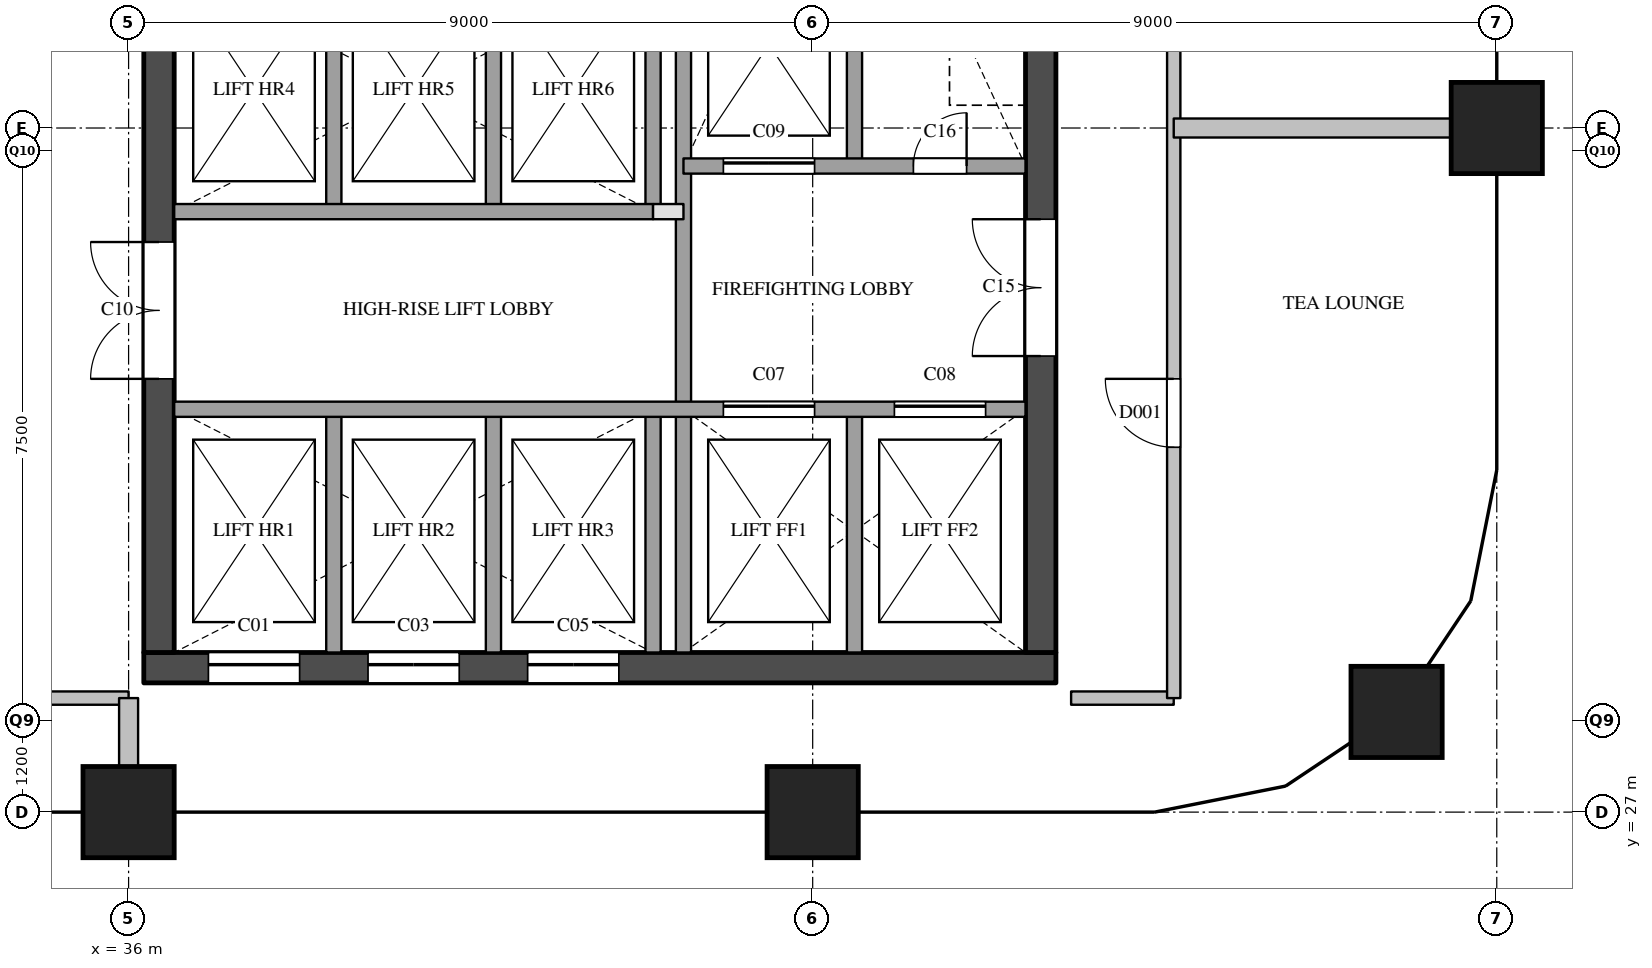
"""IFC4 building model, lengths in metres.
Left out: names, types, materials, properties, quantities, classifications, styles, units other than length and angle.
Written with IfcOpenShell. Run it as: python <this file> out.ifc"""

import sys

from ifc_helpers import new_model, si_unit, direction, frame, frame_2d, origin, origin_2d, place, context, subcontext, project, spatial, rectangle, extrude, element, fill, save


model = new_model("IFC4")
c1 = context("Model", 3, precision=1e-05, world=origin(), true_north=direction((0.0, 1.0)))
c2 = subcontext(c1, "Body", "Model", "MODEL_VIEW")
j1 = project(units=[si_unit("LENGTHUNIT", "METRE"), si_unit("PLANEANGLEUNIT", "RADIAN")], contexts=[c1])
p1 = place(None, origin())
s1 = spatial("IfcSite", under=j1, at=p1, CompositionType="ELEMENT")
p2 = place(p1, origin())
s2 = spatial("IfcBuilding", under=s1, at=p2, CompositionType="ELEMENT")
p3 = place(p2, frame((0.0, 0.0, 226.7)))
s3 = spatial("IfcBuildingStorey", under=s2, at=p3, CompositionType="ELEMENT", Elevation=226.7)
for number, where, z_axis, x_axis in (
    (1, (36.0, 27.0, 0.0), (0.0, 0.0, 1.0), (1.0, 0.0, 0.0)),
    (2, (45.0, 27.0, 0.0), (0.0, 0.0, 1.0), (1.0, 0.0, 0.0)),
    (3, (52.682, 28.318, 0.0), (0.0, 0.0, 1.0), (1.0, 0.0, 0.0)),
    (4, (54.0, 36.0, 0.0), (0.0, 0.0, 1.0), (1.0, 0.0, 0.0)),
):
    element("IfcColumn", number, at=place(p3, frame(where, z_axis=z_axis, x_axis=x_axis)), inside=s3, PredefinedType="COLUMN", context=c2, shape_type="SweptSolid", body=[
        extrude(rectangle(XDim=1.2, YDim=1.2, at=origin_2d()), origin(), (0.0, 0.0, 1.0), 3.9),
    ])
p4 = place(p3, frame((36.2, 28.9, 0.0), z_axis=(0.0, 0.0, 1.0), x_axis=(1.0, 0.0, 0.0)))
e5 = element("IfcWall", 5, at=p4, inside=s3, PredefinedType="SHEAR", context=c2, shape_type="SweptSolid", body=[
    extrude(rectangle(XDim=12.0, YDim=0.4, at=frame_2d((6.0, 0.0))), origin(), (0.0, 0.0, 1.0), 3.5),
])
p5 = place(p4, frame((0.85, 0.0, 0.0)))
e6 = element("IfcOpeningElement", 6, at=p5, cuts=e5, PredefinedType="OPENING", context=c2, shape_type="SweptSolid", body=[
    extrude(rectangle(XDim=1.2, YDim=2.1, at=frame_2d((0.6, 1.05))), frame((0.0, 0.21, 0.0), z_axis=(0.0, -1.0, 0.0), x_axis=(1.0, 0.0, 0.0)), (0.0, 0.0, 1.0), 0.42),
])
p6 = place(p4, frame((2.95, 0.0, 0.0)))
e7 = element("IfcOpeningElement", 7, at=p6, cuts=e5, PredefinedType="OPENING", context=c2, shape_type="SweptSolid", body=[
    extrude(rectangle(XDim=1.2, YDim=2.1, at=frame_2d((0.6, 1.05))), frame((0.0, 0.21, 0.0), z_axis=(0.0, -1.0, 0.0), x_axis=(1.0, 0.0, 0.0)), (0.0, 0.0, 1.0), 0.42),
])
p7 = place(p4, frame((5.05, 0.0, 0.0)))
e8 = element("IfcOpeningElement", 8, at=p7, cuts=e5, PredefinedType="OPENING", context=c2, shape_type="SweptSolid", body=[
    extrude(rectangle(XDim=1.2, YDim=2.1, at=frame_2d((0.6, 1.05))), frame((0.0, 0.21, 0.0), z_axis=(0.0, -1.0, 0.0), x_axis=(1.0, 0.0, 0.0)), (0.0, 0.0, 1.0), 0.42),
])
p8 = place(p3, frame((36.4, 29.1, 0.0), z_axis=(0.0, 0.0, 1.0), x_axis=(0.0, 1.0, 0.0)))
e9 = element("IfcWall", 9, at=p8, inside=s3, PredefinedType="SHEAR", context=c2, shape_type="SweptSolid", body=[
    extrude(rectangle(XDim=20.3, YDim=0.4, at=frame_2d((10.15, 0.0))), origin(), (0.0, 0.0, 1.0), 3.5),
])
p9 = place(p8, frame((3.6, 0.0, 0.0)))
e10 = element("IfcOpeningElement", 10, at=p9, cuts=e9, PredefinedType="OPENING", context=c2, shape_type="SweptSolid", body=[
    extrude(rectangle(XDim=1.8, YDim=2.1, at=frame_2d((0.9, 1.05))), frame((0.0, 0.21, 0.0), z_axis=(0.0, -1.0, 0.0), x_axis=(1.0, 0.0, 0.0)), (0.0, 0.0, 1.0), 0.42),
])
p10 = place(p3, frame((48.0, 29.1, 0.0), z_axis=(0.0, 0.0, 1.0), x_axis=(0.0, 1.0, 0.0)))
e11 = element("IfcWall", 11, at=p10, inside=s3, PredefinedType="SHEAR", context=c2, shape_type="SweptSolid", body=[
    extrude(rectangle(XDim=20.3, YDim=0.4, at=frame_2d((10.15, 0.0))), origin(), (0.0, 0.0, 1.0), 3.5),
])
p11 = place(p10, frame((12.5, 0.0, 0.0)))
e12 = element("IfcOpeningElement", 12, at=p11, cuts=e11, PredefinedType="OPENING", context=c2, shape_type="SweptSolid", body=[
    extrude(rectangle(XDim=0.7, YDim=2.1, at=frame_2d((0.35, 1.05))), frame((0.0, 0.21, 0.0), z_axis=(0.0, -1.0, 0.0), x_axis=(1.0, 0.0, 0.0)), (0.0, 0.0, 1.0), 0.42),
])
p12 = place(p10, frame((3.9, 0.0, 0.0)))
e13 = element("IfcOpeningElement", 13, at=p12, cuts=e11, PredefinedType="OPENING", context=c2, shape_type="SweptSolid", body=[
    extrude(rectangle(XDim=1.8, YDim=2.1, at=frame_2d((0.9, 1.05))), frame((0.0, 0.21, 0.0), z_axis=(0.0, -1.0, 0.0), x_axis=(1.0, 0.0, 0.0)), (0.0, 0.0, 1.0), 0.42),
])
p13 = place(p10, frame((16.4, 0.0, 0.0)))
e14 = element("IfcOpeningElement", 14, at=p13, cuts=e11, PredefinedType="OPENING", context=c2, shape_type="SweptSolid", body=[
    extrude(rectangle(XDim=1.0, YDim=2.1, at=frame_2d((0.5, 1.05))), frame((0.0, 0.21, 0.0), z_axis=(0.0, -1.0, 0.0), x_axis=(1.0, 0.0, 0.0)), (0.0, 0.0, 1.0), 0.42),
])
p14 = place(p3, frame((38.7, 29.1, 0.0), z_axis=(0.0, 0.0, 1.0), x_axis=(0.0, 1.0, 0.0)))
e15 = element("IfcWall", 15, at=p14, inside=s3, PredefinedType="SOLIDWALL", context=c2, shape_type="SweptSolid", body=[
    extrude(rectangle(XDim=3.2, YDim=0.2, at=frame_2d((1.6, 0.0))), origin(), (0.0, 0.0, 1.0), 3.5),
])
p15 = place(p3, frame((38.7, 34.9, 0.0), z_axis=(0.0, 0.0, 1.0), x_axis=(0.0, 1.0, 0.0)))
e16 = element("IfcWall", 16, at=p15, inside=s3, PredefinedType="SOLIDWALL", context=c2, shape_type="SweptSolid", body=[
    extrude(rectangle(XDim=3.2, YDim=0.2, at=frame_2d((1.6, 0.0))), origin(), (0.0, 0.0, 1.0), 3.5),
])
p16 = place(p3, frame((40.8, 29.1, 0.0), z_axis=(0.0, 0.0, 1.0), x_axis=(0.0, 1.0, 0.0)))
e17 = element("IfcWall", 17, at=p16, inside=s3, PredefinedType="SOLIDWALL", context=c2, shape_type="SweptSolid", body=[
    extrude(rectangle(XDim=3.2, YDim=0.2, at=frame_2d((1.6, 0.0))), origin(), (0.0, 0.0, 1.0), 3.5),
])
p17 = place(p3, frame((40.8, 34.9, 0.0), z_axis=(0.0, 0.0, 1.0), x_axis=(0.0, 1.0, 0.0)))
e18 = element("IfcWall", 18, at=p17, inside=s3, PredefinedType="SOLIDWALL", context=c2, shape_type="SweptSolid", body=[
    extrude(rectangle(XDim=3.2, YDim=0.2, at=frame_2d((1.6, 0.0))), origin(), (0.0, 0.0, 1.0), 3.5),
])
p18 = place(p3, frame((42.9, 29.1, 0.0), z_axis=(0.0, 0.0, 1.0), x_axis=(0.0, 1.0, 0.0)))
e19 = element("IfcWall", 19, at=p18, inside=s3, PredefinedType="SOLIDWALL", context=c2, shape_type="SweptSolid", body=[
    extrude(rectangle(XDim=3.2, YDim=0.2, at=frame_2d((1.6, 0.0))), origin(), (0.0, 0.0, 1.0), 3.5),
])
p19 = place(p3, frame((42.9, 34.9, 0.0), z_axis=(0.0, 0.0, 1.0), x_axis=(0.0, 1.0, 0.0)))
e20 = element("IfcWall", 20, at=p19, inside=s3, PredefinedType="SOLIDWALL", context=c2, shape_type="SweptSolid", body=[
    extrude(rectangle(XDim=3.2, YDim=0.2, at=frame_2d((1.6, 0.0))), origin(), (0.0, 0.0, 1.0), 3.5),
])
p20 = place(p3, frame((43.3, 29.1, 0.0), z_axis=(0.0, 0.0, 1.0), x_axis=(0.0, 1.0, 0.0)))
e21 = element("IfcWall", 21, at=p20, inside=s3, PredefinedType="SOLIDWALL", context=c2, shape_type="SweptSolid", body=[
    extrude(rectangle(XDim=9.9, YDim=0.2, at=frame_2d((4.95, 0.0))), origin(), (0.0, 0.0, 1.0), 3.5),
])
for number, where, z_axis, x_axis in (
    (22, (45.55, 29.1, 0.0), (0.0, 0.0, 1.0), (0.0, 1.0, 0.0)),
    (23, (45.55, 35.5, 0.0), (0.0, 0.0, 1.0), (0.0, 1.0, 0.0)),
):
    element("IfcWall", number, at=place(p3, frame(where, z_axis=z_axis, x_axis=x_axis)), inside=s3, PredefinedType="SOLIDWALL", context=c2, shape_type="SweptSolid", body=[
        extrude(rectangle(XDim=3.2, YDim=0.2, at=frame_2d((1.6, 0.0))), origin(), (0.0, 0.0, 1.0), 3.5),
    ])
p21 = place(p3, frame((36.6, 32.3, 0.0), z_axis=(0.0, 0.0, 1.0), x_axis=(1.0, 0.0, 0.0)))
e24 = element("IfcWall", 24, at=p21, inside=s3, PredefinedType="SOLIDWALL", context=c2, shape_type="SweptSolid", body=[
    extrude(rectangle(XDim=11.2, YDim=0.2, at=frame_2d((5.6, 0.0))), origin(), (0.0, 0.0, 1.0), 3.5),
])
p22 = place(p21, frame((7.225, 0.0, 0.0)))
e25 = element("IfcOpeningElement", 25, at=p22, cuts=e24, PredefinedType="OPENING", context=c2, shape_type="SweptSolid", body=[
    extrude(rectangle(XDim=1.2, YDim=2.1, at=frame_2d((0.6, 1.05))), frame((0.0, 0.11, 0.0), z_axis=(0.0, -1.0, 0.0), x_axis=(1.0, 0.0, 0.0)), (0.0, 0.0, 1.0), 0.22),
])
p23 = place(p21, frame((9.475, 0.0, 0.0)))
e26 = element("IfcOpeningElement", 26, at=p23, cuts=e24, PredefinedType="OPENING", context=c2, shape_type="SweptSolid", body=[
    extrude(rectangle(XDim=1.2, YDim=2.1, at=frame_2d((0.6, 1.05))), frame((0.0, 0.11, 0.0), z_axis=(0.0, -1.0, 0.0), x_axis=(1.0, 0.0, 0.0)), (0.0, 0.0, 1.0), 0.22),
])
p24 = place(p3, frame((42.9, 34.9, 0.0), z_axis=(0.0, 0.0, 1.0), x_axis=(1.0, 0.0, 0.0)))
e27 = element("IfcWall", 27, at=p24, inside=s3, PredefinedType="PARTITIONING", context=c2, shape_type="SweptSolid", body=[
    extrude(rectangle(XDim=0.4, YDim=0.2, at=frame_2d((0.2, 0.0))), origin(), (0.0, 0.0, 1.0), 3.5),
])
p25 = place(p3, frame((36.6, 34.9, 0.0), z_axis=(0.0, 0.0, 1.0), x_axis=(1.0, 0.0, 0.0)))
e28 = element("IfcWall", 28, at=p25, inside=s3, PredefinedType="SOLIDWALL", context=c2, shape_type="SweptSolid", body=[
    extrude(rectangle(XDim=6.3, YDim=0.2, at=frame_2d((3.15, 0.0))), origin(), (0.0, 0.0, 1.0), 3.5),
])
p26 = place(p3, frame((43.3, 35.5, 0.0), z_axis=(0.0, 0.0, 1.0), x_axis=(1.0, 0.0, 0.0)))
e29 = element("IfcWall", 29, at=p26, inside=s3, PredefinedType="SOLIDWALL", context=c2, shape_type="SweptSolid", body=[
    extrude(rectangle(XDim=4.5, YDim=0.2, at=frame_2d((2.25, 0.0))), origin(), (0.0, 0.0, 1.0), 3.5),
])
p27 = place(p26, frame((0.525, 0.0, 0.0)))
e30 = element("IfcOpeningElement", 30, at=p27, cuts=e29, PredefinedType="OPENING", context=c2, shape_type="SweptSolid", body=[
    extrude(rectangle(XDim=1.2, YDim=2.1, at=frame_2d((0.6, 1.05))), frame((0.0, 0.11, 0.0), z_axis=(0.0, -1.0, 0.0), x_axis=(1.0, 0.0, 0.0)), (0.0, 0.0, 1.0), 0.22),
])
p28 = place(p26, frame((3.025, 0.0, 0.0)))
e31 = element("IfcOpeningElement", 31, at=p28, cuts=e29, PredefinedType="OPENING", context=c2, shape_type="SweptSolid", body=[
    extrude(rectangle(XDim=0.7, YDim=2.1, at=frame_2d((0.35, 1.05))), frame((0.0, 0.11, 0.0), z_axis=(0.0, -1.0, 0.0), x_axis=(1.0, 0.0, 0.0)), (0.0, 0.0, 1.0), 0.22),
])
for number, where, z_axis, x_axis in (
    (32, (34.65, 28.5, 0.0), (0.0, 0.0, 1.0), (1.0, 0.0, 0.0)),
    (33, (48.4, 28.5, 0.0), (0.0, 0.0, 1.0), (1.0, 0.0, 0.0)),
):
    element("IfcWall", number, at=place(p3, frame(where, z_axis=z_axis, x_axis=x_axis)), inside=s3, PredefinedType="PARTITIONING", context=c2, shape_type="SweptSolid", body=[
        extrude(rectangle(XDim=1.35, YDim=0.175, at=frame_2d((0.675, 0.0))), origin(), (0.0, 0.0, 1.0), 3.5),
    ])
p29 = place(p3, frame((49.75, 28.5, 0.0), z_axis=(0.0, 0.0, 1.0), x_axis=(0.0, 1.0, 0.0)))
e34 = element("IfcWall", 34, at=p29, inside=s3, PredefinedType="PARTITIONING", context=c2, shape_type="SweptSolid", body=[
    extrude(rectangle(XDim=22.85, YDim=0.175, at=frame_2d((11.425, 0.0))), origin(), (0.0, 0.0, 1.0), 3.5),
])
p30 = place(p29, frame((3.3, 0.0, 0.0)))
e35 = element("IfcOpeningElement", 35, at=p30, cuts=e34, PredefinedType="OPENING", context=c2, shape_type="SweptSolid", body=[
    extrude(rectangle(XDim=0.9, YDim=2.1, at=frame_2d((0.45, 1.05))), frame((0.0, 0.097, 0.0), z_axis=(0.0, -1.0, 0.0), x_axis=(1.0, 0.0, 0.0)), (0.0, 0.0, 1.0), 0.195),
])
p31 = place(p29, frame((11.55, 0.0, 0.0)))
e36 = element("IfcOpeningElement", 36, at=p31, cuts=e34, PredefinedType="OPENING", context=c2, shape_type="SweptSolid", body=[
    extrude(rectangle(XDim=0.9, YDim=2.1, at=frame_2d((0.45, 1.05))), frame((0.0, 0.097, 0.0), z_axis=(0.0, -1.0, 0.0), x_axis=(1.0, 0.0, 0.0)), (0.0, 0.0, 1.0), 0.195),
])
p32 = place(p29, frame((19.225, 0.0, 0.0)))
e37 = element("IfcOpeningElement", 37, at=p32, cuts=e34, PredefinedType="OPENING", context=c2, shape_type="SweptSolid", body=[
    extrude(rectangle(XDim=0.9, YDim=2.1, at=frame_2d((0.45, 1.05))), frame((0.0, 0.097, 0.0), z_axis=(0.0, -1.0, 0.0), x_axis=(1.0, 0.0, 0.0)), (0.0, 0.0, 1.0), 0.195),
])
p33 = place(p3, frame((49.75, 36.0, 0.0), z_axis=(0.0, 0.0, 1.0), x_axis=(1.0, 0.0, 0.0)))
e38 = element("IfcWall", 38, at=p33, inside=s3, PredefinedType="PARTITIONING", context=c2, shape_type="SweptSolid", body=[
    extrude(rectangle(XDim=4.25, YDim=0.25, at=frame_2d((2.125, 0.0))), origin(), (0.0, 0.0, 1.0), 3.5),
])
p34 = place(p3, frame((36.0, 27.0, 0.0), z_axis=(0.0, 0.0, 1.0), x_axis=(0.0, 1.0, 0.0)))
e39 = element("IfcWall", 39, at=p34, inside=s3, PredefinedType="PARTITIONING", context=c2, shape_type="SweptSolid", body=[
    extrude(rectangle(XDim=1.5, YDim=0.25, at=frame_2d((0.75, 0.0))), origin(), (0.0, 0.0, 1.0), 3.5),
])
p35 = place(p5, origin())
e40 = element("IfcDoor", 40, at=p35, inside=s3, OperationType="SLIDING_TO_LEFT", PredefinedType="DOOR", context=c2, shape_type="SweptSolid", body=[
    extrude(rectangle(XDim=1.2, YDim=2.1, at=frame_2d((0.6, 1.05))), frame((0.0, 0.025, 0.0), z_axis=(0.0, -1.0, 0.0), x_axis=(1.0, 0.0, 0.0)), (0.0, 0.0, 1.0), 0.05),
])
fill(e6, e40)
p36 = place(p6, origin())
e41 = element("IfcDoor", 41, at=p36, inside=s3, OperationType="SLIDING_TO_LEFT", PredefinedType="DOOR", context=c2, shape_type="SweptSolid", body=[
    extrude(rectangle(XDim=1.2, YDim=2.1, at=frame_2d((0.6, 1.05))), frame((0.0, 0.025, 0.0), z_axis=(0.0, -1.0, 0.0), x_axis=(1.0, 0.0, 0.0)), (0.0, 0.0, 1.0), 0.05),
])
fill(e7, e41)
p37 = place(p7, origin())
e42 = element("IfcDoor", 42, at=p37, inside=s3, OperationType="SLIDING_TO_LEFT", PredefinedType="DOOR", context=c2, shape_type="SweptSolid", body=[
    extrude(rectangle(XDim=1.2, YDim=2.1, at=frame_2d((0.6, 1.05))), frame((0.0, 0.025, 0.0), z_axis=(0.0, -1.0, 0.0), x_axis=(1.0, 0.0, 0.0)), (0.0, 0.0, 1.0), 0.05),
])
fill(e8, e42)
p38 = place(p22, origin())
e43 = element("IfcDoor", 43, at=p38, inside=s3, OperationType="SLIDING_TO_LEFT", PredefinedType="DOOR", context=c2, shape_type="SweptSolid", body=[
    extrude(rectangle(XDim=1.2, YDim=2.1, at=frame_2d((0.6, 1.05))), frame((0.0, 0.025, 0.0), z_axis=(0.0, -1.0, 0.0), x_axis=(1.0, 0.0, 0.0)), (0.0, 0.0, 1.0), 0.05),
])
fill(e25, e43)
p39 = place(p23, origin())
e44 = element("IfcDoor", 44, at=p39, inside=s3, OperationType="SLIDING_TO_LEFT", PredefinedType="DOOR", context=c2, shape_type="SweptSolid", body=[
    extrude(rectangle(XDim=1.2, YDim=2.1, at=frame_2d((0.6, 1.05))), frame((0.0, 0.025, 0.0), z_axis=(0.0, -1.0, 0.0), x_axis=(1.0, 0.0, 0.0)), (0.0, 0.0, 1.0), 0.05),
])
fill(e26, e44)
p40 = place(p27, origin())
e45 = element("IfcDoor", 45, at=p40, inside=s3, OperationType="SLIDING_TO_LEFT", PredefinedType="DOOR", context=c2, shape_type="SweptSolid", body=[
    extrude(rectangle(XDim=1.2, YDim=2.1, at=frame_2d((0.6, 1.05))), frame((0.0, 0.025, 0.0), z_axis=(0.0, -1.0, 0.0), x_axis=(1.0, 0.0, 0.0)), (0.0, 0.0, 1.0), 0.05),
])
fill(e30, e45)
p41 = place(p9, origin())
e46 = element("IfcDoor", 46, at=p41, inside=s3, OperationType="DOUBLE_DOOR_SINGLE_SWING", PredefinedType="DOOR", context=c2, shape_type="SweptSolid", body=[
    extrude(rectangle(XDim=1.8, YDim=2.1, at=frame_2d((0.9, 1.05))), frame((0.0, 0.025, 0.0), z_axis=(0.0, -1.0, 0.0), x_axis=(1.0, 0.0, 0.0)), (0.0, 0.0, 1.0), 0.05),
])
fill(e10, e46)
p42 = place(p12, origin())
e47 = element("IfcDoor", 47, at=p42, inside=s3, OperationType="DOUBLE_DOOR_SINGLE_SWING", PredefinedType="DOOR", context=c2, shape_type="SweptSolid", body=[
    extrude(rectangle(XDim=1.8, YDim=2.1, at=frame_2d((0.9, 1.05))), frame((0.0, 0.025, 0.0), z_axis=(0.0, -1.0, 0.0), x_axis=(1.0, 0.0, 0.0)), (0.0, 0.0, 1.0), 0.05),
])
fill(e13, e47)
p43 = place(p28, origin())
e48 = element("IfcDoor", 48, at=p43, inside=s3, OperationType="SINGLE_SWING_RIGHT", PredefinedType="DOOR", context=c2, shape_type="SweptSolid", body=[
    extrude(rectangle(XDim=0.7, YDim=2.1, at=frame_2d((0.35, 1.05))), frame((0.0, 0.025, 0.0), z_axis=(0.0, -1.0, 0.0), x_axis=(1.0, 0.0, 0.0)), (0.0, 0.0, 1.0), 0.05),
])
fill(e31, e48)
p44 = place(p30, origin())
e49 = element("IfcDoor", 49, at=p44, inside=s3, OperationType="SINGLE_SWING_RIGHT", PredefinedType="DOOR", context=c2, shape_type="SweptSolid", body=[
    extrude(rectangle(XDim=0.9, YDim=2.1, at=frame_2d((0.45, 1.05))), frame((0.0, 0.025, 0.0), z_axis=(0.0, -1.0, 0.0), x_axis=(1.0, 0.0, 0.0)), (0.0, 0.0, 1.0), 0.05),
])
fill(e35, e49)
save(model, sys.argv[1])
